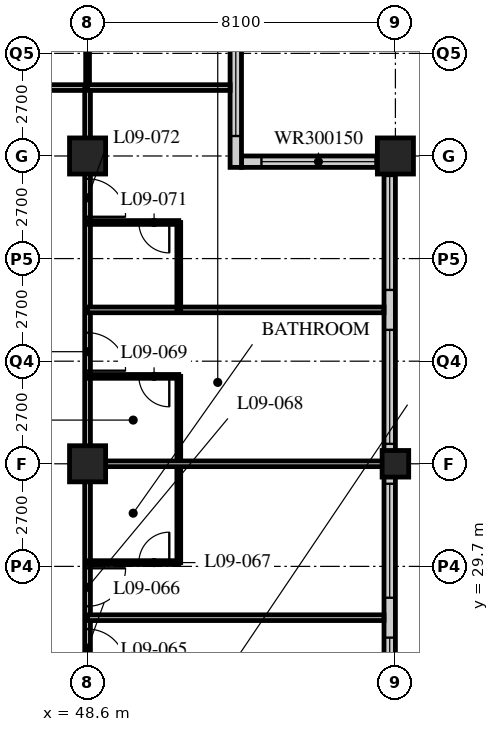
"""IFC4 building model, lengths in metres.
Left out: names, types, materials, properties, quantities, classifications, styles, units other than length and angle.
Written with IfcOpenShell. Run it as: python <this file> out.ifc"""

import sys

from ifc_helpers import new_model, si_unit, direction, frame, frame_2d, origin, origin_2d, place, context, subcontext, project, spatial, rectangle, hollow_rectangle, extrude, element, fill, save


model = new_model("IFC4")
c1 = context("Model", 3, precision=1e-05, world=origin(), true_north=direction((0.0, 1.0)))
c2 = subcontext(c1, "Body", "Model", "MODEL_VIEW")
j1 = project(units=[si_unit("LENGTHUNIT", "METRE"), si_unit("PLANEANGLEUNIT", "RADIAN")], contexts=[c1])
p1 = place(None, origin())
s1 = spatial("IfcSite", under=j1, at=p1, CompositionType="ELEMENT")
p2 = place(p1, origin())
s2 = spatial("IfcBuilding", under=s1, at=p2, CompositionType="ELEMENT")
p3 = place(p2, frame((0.0, 0.0, 43.2)))
s3 = spatial("IfcBuildingStorey", under=s2, at=p3, CompositionType="ELEMENT", Elevation=43.2)
for number, where, z_axis, x_axis in (
    (1, (48.6, 32.4, 0.0), (0.0, 0.0, 1.0), (1.0, 0.0, 0.0)),
    (2, (48.6, 40.5, 0.0), (0.0, 0.0, 1.0), (1.0, 0.0, 0.0)),
):
    element("IfcColumn", number, at=place(p3, frame(where, z_axis=z_axis, x_axis=x_axis)), inside=s3, PredefinedType="COLUMN", context=c2, shape_type="SweptSolid", body=[
        extrude(hollow_rectangle(XDim=0.95, YDim=0.95, WallThickness=0.095, at=origin_2d()), origin(), (0.0, 0.0, 1.0), 3.4),
    ])
p4 = place(p3, frame((56.7, 32.4, 0.0), z_axis=(0.0, 0.0, 1.0), x_axis=(1.0, 0.0, 0.0)))
e3 = element("IfcColumn", 3, at=p4, inside=s3, PredefinedType="COLUMN", context=c2, shape_type="SweptSolid", body=[
    extrude(hollow_rectangle(XDim=0.7, YDim=0.7, WallThickness=0.06, at=origin_2d()), origin(), (0.0, 0.0, 1.0), 3.4),
])
p5 = place(p3, frame((56.7, 40.5, 0.0), z_axis=(0.0, 0.0, 1.0), x_axis=(1.0, 0.0, 0.0)))
e4 = element("IfcColumn", 4, at=p5, inside=s3, PredefinedType="COLUMN", context=c2, shape_type="SweptSolid", body=[
    extrude(hollow_rectangle(XDim=0.95, YDim=0.95, WallThickness=0.095, at=origin_2d()), origin(), (0.0, 0.0, 1.0), 3.4),
])
p6 = place(p3, frame((56.55, 8.4, 0.0), z_axis=(0.0, 0.0, 1.0), x_axis=(0.0, 1.0, 0.0)))
e5 = element("IfcWall", 5, at=p6, inside=s3, PredefinedType="SOLIDWALL", context=c2, shape_type="SweptSolid", body=[
    extrude(rectangle(XDim=32.1, YDim=0.3, at=frame_2d((16.05, 0.0))), origin(), (0.0, 0.0, 1.0), 3.19),
])
p7 = place(p6, frame((0.225, 0.0, 0.9)))
e6 = element("IfcOpeningElement", 6, at=p7, cuts=e5, PredefinedType="OPENING", context=c2, shape_type="SweptSolid", body=[
    extrude(rectangle(XDim=3.0, YDim=2.0, at=frame_2d((1.5, 1.0))), frame((0.0, 0.16, 0.0), z_axis=(0.0, -1.0, 0.0), x_axis=(1.0, 0.0, 0.0)), (0.0, 0.0, 1.0), 0.32),
])
p8 = place(p6, frame((4.275, 0.0, 0.9)))
e7 = element("IfcOpeningElement", 7, at=p8, cuts=e5, PredefinedType="OPENING", context=c2, shape_type="SweptSolid", body=[
    extrude(rectangle(XDim=3.0, YDim=2.0, at=frame_2d((1.5, 1.0))), frame((0.0, 0.16, 0.0), z_axis=(0.0, -1.0, 0.0), x_axis=(1.0, 0.0, 0.0)), (0.0, 0.0, 1.0), 0.32),
])
p9 = place(p6, frame((8.325, 0.0, 0.9)))
e8 = element("IfcOpeningElement", 8, at=p9, cuts=e5, PredefinedType="OPENING", context=c2, shape_type="SweptSolid", body=[
    extrude(rectangle(XDim=3.0, YDim=2.0, at=frame_2d((1.5, 1.0))), frame((0.0, 0.16, 0.0), z_axis=(0.0, -1.0, 0.0), x_axis=(1.0, 0.0, 0.0)), (0.0, 0.0, 1.0), 0.32),
])
p10 = place(p6, frame((12.375, 0.0, 0.9)))
e9 = element("IfcOpeningElement", 9, at=p10, cuts=e5, PredefinedType="OPENING", context=c2, shape_type="SweptSolid", body=[
    extrude(rectangle(XDim=3.0, YDim=2.0, at=frame_2d((1.5, 1.0))), frame((0.0, 0.16, 0.0), z_axis=(0.0, -1.0, 0.0), x_axis=(1.0, 0.0, 0.0)), (0.0, 0.0, 1.0), 0.32),
])
p11 = place(p6, frame((16.425, 0.0, 0.9)))
e10 = element("IfcOpeningElement", 10, at=p11, cuts=e5, PredefinedType="OPENING", context=c2, shape_type="SweptSolid", body=[
    extrude(rectangle(XDim=3.0, YDim=2.0, at=frame_2d((1.5, 1.0))), frame((0.0, 0.16, 0.0), z_axis=(0.0, -1.0, 0.0), x_axis=(1.0, 0.0, 0.0)), (0.0, 0.0, 1.0), 0.32),
])
p12 = place(p6, frame((20.475, 0.0, 0.9)))
e11 = element("IfcOpeningElement", 11, at=p12, cuts=e5, PredefinedType="OPENING", context=c2, shape_type="SweptSolid", body=[
    extrude(rectangle(XDim=3.0, YDim=2.0, at=frame_2d((1.5, 1.0))), frame((0.0, 0.16, 0.0), z_axis=(0.0, -1.0, 0.0), x_axis=(1.0, 0.0, 0.0)), (0.0, 0.0, 1.0), 0.32),
])
p13 = place(p6, frame((24.525, 0.0, 0.9)))
e12 = element("IfcOpeningElement", 12, at=p13, cuts=e5, PredefinedType="OPENING", context=c2, shape_type="SweptSolid", body=[
    extrude(rectangle(XDim=3.0, YDim=2.0, at=frame_2d((1.5, 1.0))), frame((0.0, 0.16, 0.0), z_axis=(0.0, -1.0, 0.0), x_axis=(1.0, 0.0, 0.0)), (0.0, 0.0, 1.0), 0.32),
])
p14 = place(p6, frame((28.575, 0.0, 0.9)))
e13 = element("IfcOpeningElement", 13, at=p14, cuts=e5, PredefinedType="OPENING", context=c2, shape_type="SweptSolid", body=[
    extrude(rectangle(XDim=3.0, YDim=2.0, at=frame_2d((1.5, 1.0))), frame((0.0, 0.16, 0.0), z_axis=(0.0, -1.0, 0.0), x_axis=(1.0, 0.0, 0.0)), (0.0, 0.0, 1.0), 0.32),
])
p15 = place(p3, frame((56.4, 40.35, 0.0), z_axis=(0.0, 0.0, 1.0), x_axis=(-1.0, 0.0, 0.0)))
e14 = element("IfcWall", 14, at=p15, inside=s3, PredefinedType="SOLIDWALL", context=c2, shape_type="SweptSolid", body=[
    extrude(rectangle(XDim=3.75, YDim=0.3, at=frame_2d((1.875, 0.0))), origin(), (0.0, 0.0, 1.0), 3.19),
])
p16 = place(p15, frame((0.225, 0.0, 0.9)))
e15 = element("IfcOpeningElement", 15, at=p16, cuts=e14, PredefinedType="OPENING", context=c2, shape_type="SweptSolid", body=[
    extrude(rectangle(XDim=3.0, YDim=1.5, at=frame_2d((1.5, 0.75))), frame((0.0, 0.16, 0.0), z_axis=(0.0, -1.0, 0.0), x_axis=(1.0, 0.0, 0.0)), (0.0, 0.0, 1.0), 0.32),
])
p17 = place(p3, frame((52.5, 40.2, 0.0), z_axis=(0.0, 0.0, 1.0), x_axis=(0.0, 1.0, 0.0)))
e16 = element("IfcWall", 16, at=p17, inside=s3, PredefinedType="SOLIDWALL", context=c2, shape_type="SweptSolid", body=[
    extrude(rectangle(XDim=4.35, YDim=0.3, at=frame_2d((2.175, 0.0))), origin(), (0.0, 0.0, 1.0), 3.19),
])
p18 = place(p17, frame((0.825, 0.0, 0.9)))
e17 = element("IfcOpeningElement", 17, at=p18, cuts=e16, PredefinedType="OPENING", context=c2, shape_type="SweptSolid", body=[
    extrude(rectangle(XDim=3.0, YDim=1.5, at=frame_2d((1.5, 0.75))), frame((0.0, 0.16, 0.0), z_axis=(0.0, -1.0, 0.0), x_axis=(1.0, 0.0, 0.0)), (0.0, 0.0, 1.0), 0.32),
])
p19 = place(p3, frame((8.1, 42.3, 0.0), z_axis=(0.0, 0.0, 1.0), x_axis=(1.0, 0.0, 0.0)))
e18 = element("IfcWall", 18, at=p19, inside=s3, PredefinedType="PARTITIONING", context=c2, shape_type="SweptSolid", body=[
    extrude(rectangle(XDim=40.5, YDim=0.15, at=frame_2d((20.25, 0.0))), origin(), (0.0, 0.0, 1.0), 3.19),
])
p20 = place(p19, frame((6.5, 0.0, 0.0)))
e19 = element("IfcOpeningElement", 19, at=p20, cuts=e18, PredefinedType="OPENING", context=c2, shape_type="SweptSolid", body=[
    extrude(rectangle(XDim=1.0, YDim=2.1, at=frame_2d((0.5, 1.05))), frame((0.0, 0.085, 0.0), z_axis=(0.0, -1.0, 0.0), x_axis=(1.0, 0.0, 0.0)), (0.0, 0.0, 1.0), 0.17),
])
p21 = place(p19, frame((10.55, 0.0, 0.0)))
e20 = element("IfcOpeningElement", 20, at=p21, cuts=e18, PredefinedType="OPENING", context=c2, shape_type="SweptSolid", body=[
    extrude(rectangle(XDim=1.0, YDim=2.1, at=frame_2d((0.5, 1.05))), frame((0.0, 0.085, 0.0), z_axis=(0.0, -1.0, 0.0), x_axis=(1.0, 0.0, 0.0)), (0.0, 0.0, 1.0), 0.17),
])
p22 = place(p19, frame((14.6, 0.0, 0.0)))
e21 = element("IfcOpeningElement", 21, at=p22, cuts=e18, PredefinedType="OPENING", context=c2, shape_type="SweptSolid", body=[
    extrude(rectangle(XDim=1.0, YDim=2.1, at=frame_2d((0.5, 1.05))), frame((0.0, 0.085, 0.0), z_axis=(0.0, -1.0, 0.0), x_axis=(1.0, 0.0, 0.0)), (0.0, 0.0, 1.0), 0.17),
])
p23 = place(p19, frame((18.65, 0.0, 0.0)))
e22 = element("IfcOpeningElement", 22, at=p23, cuts=e18, PredefinedType="OPENING", context=c2, shape_type="SweptSolid", body=[
    extrude(rectangle(XDim=1.0, YDim=2.1, at=frame_2d((0.5, 1.05))), frame((0.0, 0.085, 0.0), z_axis=(0.0, -1.0, 0.0), x_axis=(1.0, 0.0, 0.0)), (0.0, 0.0, 1.0), 0.17),
])
p24 = place(p19, frame((22.7, 0.0, 0.0)))
e23 = element("IfcOpeningElement", 23, at=p24, cuts=e18, PredefinedType="OPENING", context=c2, shape_type="SweptSolid", body=[
    extrude(rectangle(XDim=1.0, YDim=2.1, at=frame_2d((0.5, 1.05))), frame((0.0, 0.085, 0.0), z_axis=(0.0, -1.0, 0.0), x_axis=(1.0, 0.0, 0.0)), (0.0, 0.0, 1.0), 0.17),
])
p25 = place(p19, frame((26.75, 0.0, 0.0)))
e24 = element("IfcOpeningElement", 24, at=p25, cuts=e18, PredefinedType="OPENING", context=c2, shape_type="SweptSolid", body=[
    extrude(rectangle(XDim=1.0, YDim=2.1, at=frame_2d((0.5, 1.05))), frame((0.0, 0.085, 0.0), z_axis=(0.0, -1.0, 0.0), x_axis=(1.0, 0.0, 0.0)), (0.0, 0.0, 1.0), 0.17),
])
p26 = place(p19, frame((30.8, 0.0, 0.0)))
e25 = element("IfcOpeningElement", 25, at=p26, cuts=e18, PredefinedType="OPENING", context=c2, shape_type="SweptSolid", body=[
    extrude(rectangle(XDim=1.0, YDim=2.1, at=frame_2d((0.5, 1.05))), frame((0.0, 0.085, 0.0), z_axis=(0.0, -1.0, 0.0), x_axis=(1.0, 0.0, 0.0)), (0.0, 0.0, 1.0), 0.17),
])
p27 = place(p19, frame((34.85, 0.0, 0.0)))
e26 = element("IfcOpeningElement", 26, at=p27, cuts=e18, PredefinedType="OPENING", context=c2, shape_type="SweptSolid", body=[
    extrude(rectangle(XDim=1.0, YDim=2.1, at=frame_2d((0.5, 1.05))), frame((0.0, 0.085, 0.0), z_axis=(0.0, -1.0, 0.0), x_axis=(1.0, 0.0, 0.0)), (0.0, 0.0, 1.0), 0.17),
])
p28 = place(p19, frame((36.875, 0.0, 0.0)))
e27 = element("IfcOpeningElement", 27, at=p28, cuts=e18, PredefinedType="OPENING", context=c2, shape_type="SweptSolid", body=[
    extrude(rectangle(XDim=1.0, YDim=2.1, at=frame_2d((0.5, 1.05))), frame((0.0, 0.085, 0.0), z_axis=(0.0, -1.0, 0.0), x_axis=(1.0, 0.0, 0.0)), (0.0, 0.0, 1.0), 0.17),
])
p29 = place(p19, frame((2.625, 0.0, 0.0)))
e28 = element("IfcOpeningElement", 28, at=p29, cuts=e18, PredefinedType="OPENING", context=c2, shape_type="SweptSolid", body=[
    extrude(rectangle(XDim=1.0, YDim=2.1, at=frame_2d((0.5, 1.05))), frame((0.0, 0.085, 0.0), z_axis=(0.0, -1.0, 0.0), x_axis=(1.0, 0.0, 0.0)), (0.0, 0.0, 1.0), 0.17),
])
p30 = place(p3, frame((48.6, 16.2, 0.0), z_axis=(0.0, 0.0, 1.0), x_axis=(0.0, 1.0, 0.0)))
e29 = element("IfcWall", 29, at=p30, inside=s3, PredefinedType="PARTITIONING", context=c2, shape_type="SweptSolid", body=[
    extrude(rectangle(XDim=26.1, YDim=0.15, at=frame_2d((13.05, 0.0))), origin(), (0.0, 0.0, 1.0), 2.578),
])
p31 = place(p30, frame((2.75, 0.0, 0.0)))
e30 = element("IfcOpeningElement", 30, at=p31, cuts=e29, PredefinedType="OPENING", context=c2, shape_type="SweptSolid", body=[
    extrude(rectangle(XDim=1.0, YDim=2.1, at=frame_2d((0.5, 1.05))), frame((0.0, 0.085, 0.0), z_axis=(0.0, -1.0, 0.0), x_axis=(1.0, 0.0, 0.0)), (0.0, 0.0, 1.0), 0.17),
])
p32 = place(p30, frame((4.35, 0.0, 0.0)))
e31 = element("IfcOpeningElement", 31, at=p32, cuts=e29, PredefinedType="OPENING", context=c2, shape_type="SweptSolid", body=[
    extrude(rectangle(XDim=1.0, YDim=2.1, at=frame_2d((0.5, 1.05))), frame((0.0, 0.085, 0.0), z_axis=(0.0, -1.0, 0.0), x_axis=(1.0, 0.0, 0.0)), (0.0, 0.0, 1.0), 0.17),
])
p33 = place(p30, frame((10.85, 0.0, 0.0)))
e32 = element("IfcOpeningElement", 32, at=p33, cuts=e29, PredefinedType="OPENING", context=c2, shape_type="SweptSolid", body=[
    extrude(rectangle(XDim=1.0, YDim=2.1, at=frame_2d((0.5, 1.05))), frame((0.0, 0.085, 0.0), z_axis=(0.0, -1.0, 0.0), x_axis=(1.0, 0.0, 0.0)), (0.0, 0.0, 1.0), 0.17),
])
p34 = place(p30, frame((12.45, 0.0, 0.0)))
e33 = element("IfcOpeningElement", 33, at=p34, cuts=e29, PredefinedType="OPENING", context=c2, shape_type="SweptSolid", body=[
    extrude(rectangle(XDim=1.0, YDim=2.1, at=frame_2d((0.5, 1.05))), frame((0.0, 0.085, 0.0), z_axis=(0.0, -1.0, 0.0), x_axis=(1.0, 0.0, 0.0)), (0.0, 0.0, 1.0), 0.17),
])
p35 = place(p30, frame((18.65, 0.0, 0.0)))
e34 = element("IfcOpeningElement", 34, at=p35, cuts=e29, PredefinedType="OPENING", context=c2, shape_type="SweptSolid", body=[
    extrude(rectangle(XDim=1.0, YDim=2.1, at=frame_2d((0.5, 1.05))), frame((0.0, 0.085, 0.0), z_axis=(0.0, -1.0, 0.0), x_axis=(1.0, 0.0, 0.0)), (0.0, 0.0, 1.0), 0.17),
])
p36 = place(p30, frame((22.7, 0.0, 0.0)))
e35 = element("IfcOpeningElement", 35, at=p36, cuts=e29, PredefinedType="OPENING", context=c2, shape_type="SweptSolid", body=[
    extrude(rectangle(XDim=1.0, YDim=2.1, at=frame_2d((0.5, 1.05))), frame((0.0, 0.085, 0.0), z_axis=(0.0, -1.0, 0.0), x_axis=(1.0, 0.0, 0.0)), (0.0, 0.0, 1.0), 0.17),
])
p37 = place(p3, frame((48.6, 28.35, 0.0), z_axis=(0.0, 0.0, 1.0), x_axis=(1.0, 0.0, 0.0)))
e36 = element("IfcWall", 36, at=p37, inside=s3, PredefinedType="PARTITIONING", context=c2, shape_type="SweptSolid", body=[
    extrude(rectangle(XDim=7.8, YDim=0.15, at=frame_2d((3.9, 0.0))), origin(), (0.0, 0.0, 1.0), 3.19),
])
p38 = place(p3, frame((51.0, 29.8, 0.0), z_axis=(0.0, 0.0, 1.0), x_axis=(0.0, 1.0, 0.0)))
e37 = element("IfcWall", 37, at=p38, inside=s3, PredefinedType="PARTITIONING", context=c2, shape_type="SweptSolid", body=[
    extrude(rectangle(XDim=4.9, YDim=0.1, at=frame_2d((2.45, 0.0))), origin(), (0.0, 0.0, 1.0), 3.19),
])
p39 = place(p3, frame((48.6, 29.8, 0.0), z_axis=(0.0, 0.0, 1.0), x_axis=(1.0, 0.0, 0.0)))
e38 = element("IfcWall", 38, at=p39, inside=s3, PredefinedType="PARTITIONING", context=c2, shape_type="SweptSolid", body=[
    extrude(rectangle(XDim=2.4, YDim=0.1, at=frame_2d((1.2, 0.0))), origin(), (0.0, 0.0, 1.0), 3.19),
])
p40 = place(p39, frame((1.35, 0.0, 0.0)))
e39 = element("IfcOpeningElement", 39, at=p40, cuts=e38, PredefinedType="OPENING", context=c2, shape_type="SweptSolid", body=[
    extrude(rectangle(XDim=0.8, YDim=2.1, at=frame_2d((0.4, 1.05))), frame((0.0, 0.06, 0.0), z_axis=(0.0, -1.0, 0.0), x_axis=(1.0, 0.0, 0.0)), (0.0, 0.0, 1.0), 0.12),
])
p41 = place(p3, frame((48.6, 32.4, 0.0), z_axis=(0.0, 0.0, 1.0), x_axis=(1.0, 0.0, 0.0)))
e40 = element("IfcWall", 40, at=p41, inside=s3, PredefinedType="PARTITIONING", context=c2, shape_type="SweptSolid", body=[
    extrude(rectangle(XDim=7.8, YDim=0.15, at=frame_2d((3.9, 0.0))), origin(), (0.0, 0.0, 1.0), 2.578),
])
p42 = place(p3, frame((48.6, 34.7, 0.0), z_axis=(0.0, 0.0, 1.0), x_axis=(1.0, 0.0, 0.0)))
e41 = element("IfcWall", 41, at=p42, inside=s3, PredefinedType="PARTITIONING", context=c2, shape_type="SweptSolid", body=[
    extrude(rectangle(XDim=2.4, YDim=0.1, at=frame_2d((1.2, 0.0))), origin(), (0.0, 0.0, 1.0), 3.19),
])
p43 = place(p42, frame((1.35, 0.0, 0.0)))
e42 = element("IfcOpeningElement", 42, at=p43, cuts=e41, PredefinedType="OPENING", context=c2, shape_type="SweptSolid", body=[
    extrude(rectangle(XDim=0.8, YDim=2.1, at=frame_2d((0.4, 1.05))), frame((0.0, 0.06, 0.0), z_axis=(0.0, -1.0, 0.0), x_axis=(1.0, 0.0, 0.0)), (0.0, 0.0, 1.0), 0.12),
])
p44 = place(p3, frame((48.6, 36.45, 0.0), z_axis=(0.0, 0.0, 1.0), x_axis=(1.0, 0.0, 0.0)))
e43 = element("IfcWall", 43, at=p44, inside=s3, PredefinedType="PARTITIONING", context=c2, shape_type="SweptSolid", body=[
    extrude(rectangle(XDim=7.8, YDim=0.15, at=frame_2d((3.9, 0.0))), origin(), (0.0, 0.0, 1.0), 3.19),
])
p45 = place(p3, frame((51.0, 36.45, 0.0), z_axis=(0.0, 0.0, 1.0), x_axis=(0.0, 1.0, 0.0)))
e44 = element("IfcWall", 44, at=p45, inside=s3, PredefinedType="PARTITIONING", context=c2, shape_type="SweptSolid", body=[
    extrude(rectangle(XDim=2.3, YDim=0.1, at=frame_2d((1.15, 0.0))), origin(), (0.0, 0.0, 1.0), 3.19),
])
p46 = place(p3, frame((48.6, 38.75, 0.0), z_axis=(0.0, 0.0, 1.0), x_axis=(1.0, 0.0, 0.0)))
e45 = element("IfcWall", 45, at=p46, inside=s3, PredefinedType="PARTITIONING", context=c2, shape_type="SweptSolid", body=[
    extrude(rectangle(XDim=2.4, YDim=0.1, at=frame_2d((1.2, 0.0))), origin(), (0.0, 0.0, 1.0), 3.19),
])
p47 = place(p46, frame((1.35, 0.0, 0.0)))
e46 = element("IfcOpeningElement", 46, at=p47, cuts=e45, PredefinedType="OPENING", context=c2, shape_type="SweptSolid", body=[
    extrude(rectangle(XDim=0.8, YDim=2.1, at=frame_2d((0.4, 1.05))), frame((0.0, 0.06, 0.0), z_axis=(0.0, -1.0, 0.0), x_axis=(1.0, 0.0, 0.0)), (0.0, 0.0, 1.0), 0.12),
])
p48 = place(p3, frame((48.6, 42.3, 0.0), z_axis=(0.0, 0.0, 1.0), x_axis=(0.0, 1.0, 0.0)))
e47 = element("IfcWall", 47, at=p48, inside=s3, PredefinedType="PARTITIONING", context=c2, shape_type="SweptSolid", body=[
    extrude(rectangle(XDim=1.95, YDim=0.1, at=frame_2d((0.975, 0.0))), origin(), (0.0, 0.0, 1.0), 2.578),
])
p49 = place(p3, frame((48.6, 42.3, 0.0), z_axis=(0.0, 0.0, 1.0), x_axis=(1.0, 0.0, 0.0)))
e48 = element("IfcWall", 48, at=p49, inside=s3, PredefinedType="PARTITIONING", context=c2, shape_type="SweptSolid", body=[
    extrude(rectangle(XDim=3.75, YDim=0.15, at=frame_2d((1.875, 0.0))), origin(), (0.0, 0.0, 1.0), 3.19),
])
p50 = place(p11, origin())
e49 = element("IfcWindow", 49, at=p50, inside=s3, PartitioningType="SINGLE_PANEL", PredefinedType="WINDOW", context=c2, shape_type="SweptSolid", body=[
    extrude(rectangle(XDim=3.0, YDim=2.0, at=frame_2d((1.5, 1.0))), frame((0.0, 0.03, 0.0), z_axis=(0.0, -1.0, 0.0), x_axis=(1.0, 0.0, 0.0)), (0.0, 0.0, 1.0), 0.06),
])
fill(e10, e49)
p51 = place(p12, origin())
e50 = element("IfcWindow", 50, at=p51, inside=s3, PartitioningType="SINGLE_PANEL", PredefinedType="WINDOW", context=c2, shape_type="SweptSolid", body=[
    extrude(rectangle(XDim=3.0, YDim=2.0, at=frame_2d((1.5, 1.0))), frame((0.0, 0.03, 0.0), z_axis=(0.0, -1.0, 0.0), x_axis=(1.0, 0.0, 0.0)), (0.0, 0.0, 1.0), 0.06),
])
fill(e11, e50)
p52 = place(p13, origin())
e51 = element("IfcWindow", 51, at=p52, inside=s3, PartitioningType="SINGLE_PANEL", PredefinedType="WINDOW", context=c2, shape_type="SweptSolid", body=[
    extrude(rectangle(XDim=3.0, YDim=2.0, at=frame_2d((1.5, 1.0))), frame((0.0, 0.03, 0.0), z_axis=(0.0, -1.0, 0.0), x_axis=(1.0, 0.0, 0.0)), (0.0, 0.0, 1.0), 0.06),
])
fill(e12, e51)
p53 = place(p14, origin())
e52 = element("IfcWindow", 52, at=p53, inside=s3, PartitioningType="SINGLE_PANEL", PredefinedType="WINDOW", context=c2, shape_type="SweptSolid", body=[
    extrude(rectangle(XDim=3.0, YDim=2.0, at=frame_2d((1.5, 1.0))), frame((0.0, 0.03, 0.0), z_axis=(0.0, -1.0, 0.0), x_axis=(1.0, 0.0, 0.0)), (0.0, 0.0, 1.0), 0.06),
])
fill(e13, e52)
p54 = place(p16, origin())
e53 = element("IfcWindow", 53, at=p54, inside=s3, PartitioningType="SINGLE_PANEL", PredefinedType="WINDOW", context=c2, shape_type="SweptSolid", body=[
    extrude(rectangle(XDim=3.0, YDim=1.5, at=frame_2d((1.5, 0.75))), frame((0.0, 0.03, 0.0), z_axis=(0.0, -1.0, 0.0), x_axis=(1.0, 0.0, 0.0)), (0.0, 0.0, 1.0), 0.06),
])
fill(e15, e53)
p55 = place(p18, origin())
e54 = element("IfcWindow", 54, at=p55, inside=s3, PartitioningType="SINGLE_PANEL", PredefinedType="WINDOW", context=c2, shape_type="SweptSolid", body=[
    extrude(rectangle(XDim=3.0, YDim=1.5, at=frame_2d((1.5, 0.75))), frame((0.0, 0.03, 0.0), z_axis=(0.0, -1.0, 0.0), x_axis=(1.0, 0.0, 0.0)), (0.0, 0.0, 1.0), 0.06),
])
fill(e17, e54)
p56 = place(p33, origin())
e55 = element("IfcDoor", 55, at=p56, inside=s3, OperationType="SINGLE_SWING_RIGHT", PredefinedType="DOOR", context=c2, shape_type="SweptSolid", body=[
    extrude(rectangle(XDim=1.0, YDim=2.1, at=frame_2d((0.5, 1.05))), frame((0.0, 0.025, 0.0), z_axis=(0.0, -1.0, 0.0), x_axis=(1.0, 0.0, 0.0)), (0.0, 0.0, 1.0), 0.05),
])
fill(e32, e55)
p57 = place(p40, origin())
e56 = element("IfcDoor", 56, at=p57, inside=s3, OperationType="SINGLE_SWING_RIGHT", PredefinedType="DOOR", context=c2, shape_type="SweptSolid", body=[
    extrude(rectangle(XDim=0.8, YDim=2.1, at=frame_2d((0.4, 1.05))), frame((0.0, 0.025, 0.0), z_axis=(0.0, -1.0, 0.0), x_axis=(1.0, 0.0, 0.0)), (0.0, 0.0, 1.0), 0.05),
])
fill(e39, e56)
p58 = place(p34, origin())
e57 = element("IfcDoor", 57, at=p58, inside=s3, OperationType="SINGLE_SWING_LEFT", PredefinedType="DOOR", context=c2, shape_type="SweptSolid", body=[
    extrude(rectangle(XDim=1.0, YDim=2.1, at=frame_2d((0.5, 1.05))), frame((0.0, 0.025, 0.0), z_axis=(0.0, -1.0, 0.0), x_axis=(1.0, 0.0, 0.0)), (0.0, 0.0, 1.0), 0.05),
])
fill(e33, e57)
p59 = place(p43, origin())
e58 = element("IfcDoor", 58, at=p59, inside=s3, OperationType="SINGLE_SWING_LEFT", PredefinedType="DOOR", context=c2, shape_type="SweptSolid", body=[
    extrude(rectangle(XDim=0.8, YDim=2.1, at=frame_2d((0.4, 1.05))), frame((0.0, 0.025, 0.0), z_axis=(0.0, -1.0, 0.0), x_axis=(1.0, 0.0, 0.0)), (0.0, 0.0, 1.0), 0.05),
])
fill(e42, e58)
p60 = place(p35, origin())
e59 = element("IfcDoor", 59, at=p60, inside=s3, OperationType="SINGLE_SWING_RIGHT", PredefinedType="DOOR", context=c2, shape_type="SweptSolid", body=[
    extrude(rectangle(XDim=1.0, YDim=2.1, at=frame_2d((0.5, 1.05))), frame((0.0, 0.025, 0.0), z_axis=(0.0, -1.0, 0.0), x_axis=(1.0, 0.0, 0.0)), (0.0, 0.0, 1.0), 0.05),
])
fill(e34, e59)
p61 = place(p47, origin())
e60 = element("IfcDoor", 60, at=p61, inside=s3, OperationType="SINGLE_SWING_LEFT", PredefinedType="DOOR", context=c2, shape_type="SweptSolid", body=[
    extrude(rectangle(XDim=0.8, YDim=2.1, at=frame_2d((0.4, 1.05))), frame((0.0, 0.025, 0.0), z_axis=(0.0, -1.0, 0.0), x_axis=(1.0, 0.0, 0.0)), (0.0, 0.0, 1.0), 0.05),
])
fill(e46, e60)
p62 = place(p36, origin())
e61 = element("IfcDoor", 61, at=p62, inside=s3, OperationType="SINGLE_SWING_RIGHT", PredefinedType="DOOR", context=c2, shape_type="SweptSolid", body=[
    extrude(rectangle(XDim=1.0, YDim=2.1, at=frame_2d((0.5, 1.05))), frame((0.0, 0.025, 0.0), z_axis=(0.0, -1.0, 0.0), x_axis=(1.0, 0.0, 0.0)), (0.0, 0.0, 1.0), 0.05),
])
fill(e35, e61)
save(model, sys.argv[1])
